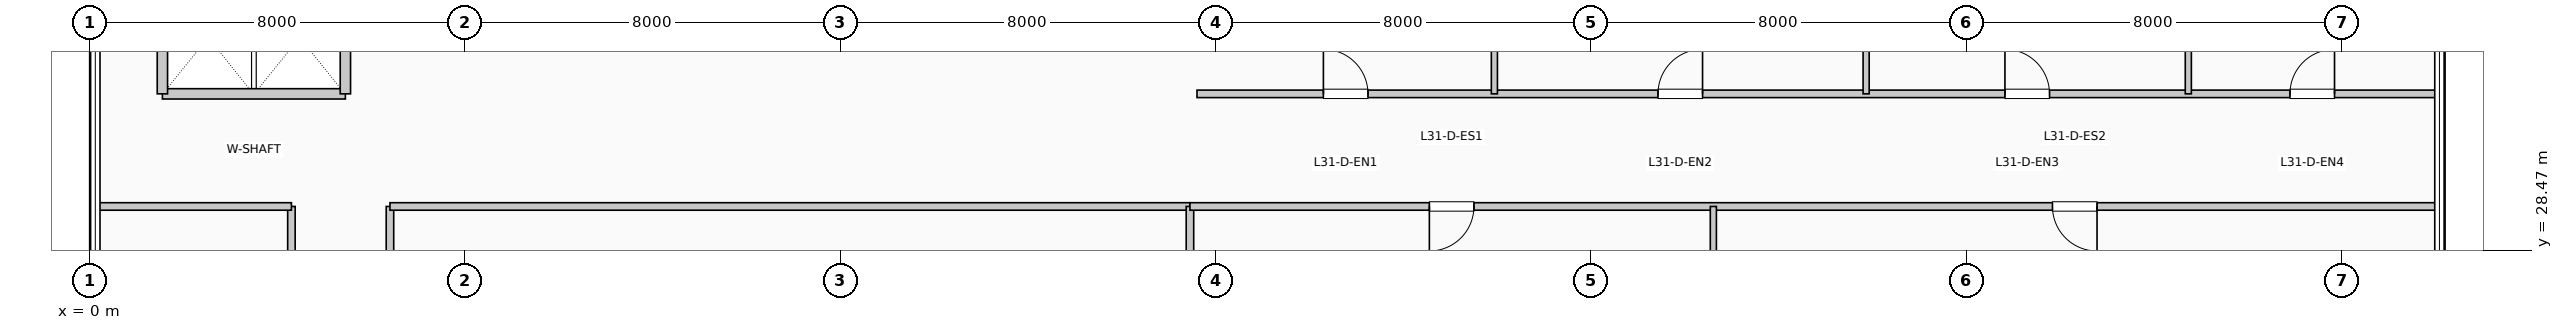
"""IFC4 building model, lengths in metres.
Left out: names, types, materials, properties, quantities, classifications, styles, units other than length and angle.
Written with IfcOpenShell. Run it as: python <this file> out.ifc"""

import sys

from ifc_helpers import new_model, si_unit, direction, frame, frame_2d, origin, place, context, subcontext, project, spatial, rectangle, extrude, element, fill, save


model = new_model("IFC4")
c1 = context("Model", 3, precision=1e-05, world=origin(), true_north=direction((0.0, 1.0)))
c2 = subcontext(c1, "Body", "Model", "MODEL_VIEW")
j1 = project(units=[si_unit("LENGTHUNIT", "METRE"), si_unit("PLANEANGLEUNIT", "RADIAN")], contexts=[c1])
p1 = place(None, origin())
s1 = spatial("IfcSite", under=j1, at=p1, CompositionType="ELEMENT")
p2 = place(p1, origin())
s2 = spatial("IfcBuilding", under=s1, at=p2, CompositionType="ELEMENT")
p3 = place(p2, frame((0.0, 0.0, 130.35)))
s3 = spatial("IfcBuildingStorey", under=s2, at=p3, CompositionType="ELEMENT", Elevation=130.35)
p4 = place(p3, frame((1.55, 31.8, 0.0), z_axis=(0.0, 0.0, 1.0), x_axis=(1.0, 0.0, 0.0)))
e1 = element("IfcWall", 1, at=p4, inside=s3, PredefinedType="PARTITIONING", context=c2, shape_type="SweptSolid", body=[
    extrude(rectangle(XDim=3.9, YDim=0.22, at=frame_2d((1.95, 0.0))), origin(), (0.0, 0.0, 1.0), 4.37),
])
for number, where, z_axis, x_axis in (
    (2, (1.55, 31.8, 0.0), (0.0, 0.0, 1.0), (0.0, 1.0, 0.0)),
    (3, (5.45, 31.8, 0.0), (0.0, 0.0, 1.0), (0.0, 1.0, 0.0)),
):
    element("IfcWall", number, at=place(p3, frame(where, z_axis=z_axis, x_axis=x_axis)), inside=s3, PredefinedType="PARTITIONING", context=c2, shape_type="SweptSolid", body=[
        extrude(rectangle(XDim=2.38, YDim=0.22, at=frame_2d((1.19, 0.0))), origin(), (0.0, 0.0, 1.0), 4.37),
    ])
p5 = place(p3, frame((4.3, 8.6, 0.0), z_axis=(0.0, 0.0, 1.0), x_axis=(0.0, 1.0, 0.0)))
e4 = element("IfcWall", 4, at=p5, inside=s3, PredefinedType="PARTITIONING", context=c2, shape_type="SweptSolid", body=[
    extrude(rectangle(XDim=20.8, YDim=0.16, at=frame_2d((10.4, 0.0))), origin(), (0.0, 0.0, 1.0), 4.37),
])
p6 = place(p5, frame((4.011, 0.0, 0.0), z_axis=(0.0, 0.0, 1.0), x_axis=(-1.0, 0.0, 0.0)))
e5 = element("IfcOpeningElement", 5, at=p6, cuts=e4, PredefinedType="OPENING", context=c2, shape_type="SweptSolid", body=[
    extrude(rectangle(XDim=0.95, YDim=2.15, at=frame_2d((0.475, 1.075))), frame((0.0, 0.09, 0.0), z_axis=(0.0, -1.0, 0.0), x_axis=(1.0, 0.0, 0.0)), (0.0, 0.0, 1.0), 0.18),
])
p7 = place(p5, frame((11.083, 0.0, 0.0), z_axis=(0.0, 0.0, 1.0), x_axis=(-1.0, 0.0, 0.0)))
e6 = element("IfcOpeningElement", 6, at=p7, cuts=e4, PredefinedType="OPENING", context=c2, shape_type="SweptSolid", body=[
    extrude(rectangle(XDim=0.95, YDim=2.15, at=frame_2d((0.475, 1.075))), frame((0.0, 0.09, 0.0), z_axis=(0.0, -1.0, 0.0), x_axis=(1.0, 0.0, 0.0)), (0.0, 0.0, 1.0), 0.18),
])
p8 = place(p5, frame((17.947, 0.0, 0.0), z_axis=(0.0, 0.0, 1.0), x_axis=(-1.0, 0.0, 0.0)))
e7 = element("IfcOpeningElement", 7, at=p8, cuts=e4, PredefinedType="OPENING", context=c2, shape_type="SweptSolid", body=[
    extrude(rectangle(XDim=0.95, YDim=2.15, at=frame_2d((0.475, 1.075))), frame((0.0, 0.09, 0.0), z_axis=(0.0, -1.0, 0.0), x_axis=(1.0, 0.0, 0.0)), (0.0, 0.0, 1.0), 0.18),
])
p9 = place(p3, frame((6.4, 8.6, 0.0), z_axis=(0.0, 0.0, 1.0), x_axis=(0.0, 1.0, 0.0)))
e8 = element("IfcWall", 8, at=p9, inside=s3, PredefinedType="PARTITIONING", context=c2, shape_type="SweptSolid", body=[
    extrude(rectangle(XDim=20.8, YDim=0.16, at=frame_2d((10.4, 0.0))), origin(), (0.0, 0.0, 1.0), 4.37),
])
p10 = place(p9, frame((1.397, 0.0, 0.0)))
e9 = element("IfcOpeningElement", 9, at=p10, cuts=e8, PredefinedType="OPENING", context=c2, shape_type="SweptSolid", body=[
    extrude(rectangle(XDim=0.95, YDim=2.15, at=frame_2d((0.475, 1.075))), frame((0.0, 0.09, 0.0), z_axis=(0.0, -1.0, 0.0), x_axis=(1.0, 0.0, 0.0)), (0.0, 0.0, 1.0), 0.18),
])
p11 = place(p9, frame((5.349, 0.0, 0.0)))
e10 = element("IfcOpeningElement", 10, at=p11, cuts=e8, PredefinedType="OPENING", context=c2, shape_type="SweptSolid", body=[
    extrude(rectangle(XDim=0.95, YDim=2.15, at=frame_2d((0.475, 1.075))), frame((0.0, 0.09, 0.0), z_axis=(0.0, -1.0, 0.0), x_axis=(1.0, 0.0, 0.0)), (0.0, 0.0, 1.0), 0.18),
])
p12 = place(p9, frame((9.717, 0.0, 0.0)))
e11 = element("IfcOpeningElement", 11, at=p12, cuts=e8, PredefinedType="OPENING", context=c2, shape_type="SweptSolid", body=[
    extrude(rectangle(XDim=0.95, YDim=2.15, at=frame_2d((0.475, 1.075))), frame((0.0, 0.09, 0.0), z_axis=(0.0, -1.0, 0.0), x_axis=(1.0, 0.0, 0.0)), (0.0, 0.0, 1.0), 0.18),
])
p13 = place(p9, frame((14.293, 0.0, 0.0)))
e12 = element("IfcOpeningElement", 12, at=p13, cuts=e8, PredefinedType="OPENING", context=c2, shape_type="SweptSolid", body=[
    extrude(rectangle(XDim=0.95, YDim=2.15, at=frame_2d((0.475, 1.075))), frame((0.0, 0.09, 0.0), z_axis=(0.0, -1.0, 0.0), x_axis=(1.0, 0.0, 0.0)), (0.0, 0.0, 1.0), 0.18),
])
p14 = place(p9, frame((18.453, 0.0, 0.0)))
e13 = element("IfcOpeningElement", 13, at=p14, cuts=e8, PredefinedType="OPENING", context=c2, shape_type="SweptSolid", body=[
    extrude(rectangle(XDim=0.95, YDim=2.15, at=frame_2d((0.475, 1.075))), frame((0.0, 0.09, 0.0), z_axis=(0.0, -1.0, 0.0), x_axis=(1.0, 0.0, 0.0)), (0.0, 0.0, 1.0), 0.18),
])
p15 = place(p3, frame((0.19, 29.4, 0.0), z_axis=(0.0, 0.0, 1.0), x_axis=(1.0, 0.0, 0.0)))
e14 = element("IfcWall", 14, at=p15, inside=s3, PredefinedType="PARTITIONING", context=c2, shape_type="SweptSolid", body=[
    extrude(rectangle(XDim=4.11, YDim=0.16, at=frame_2d((2.055, 0.0))), origin(), (0.0, 0.0, 1.0), 4.025),
])
p16 = place(p3, frame((6.4, 29.4, 0.0), z_axis=(0.0, 0.0, 1.0), x_axis=(1.0, 0.0, 0.0)))
e15 = element("IfcWall", 15, at=p16, inside=s3, PredefinedType="PARTITIONING", context=c2, shape_type="SweptSolid", body=[
    extrude(rectangle(XDim=17.05, YDim=0.16, at=frame_2d((8.525, 0.0))), origin(), (0.0, 0.0, 1.0), 4.025),
])
p17 = place(p3, frame((23.45, 1.04, 0.0), z_axis=(0.0, 0.0, 1.0), x_axis=(0.0, 1.0, 0.0)))
e16 = element("IfcWall", 16, at=p17, inside=s3, PredefinedType="PARTITIONING", context=c2, shape_type="SweptSolid", body=[
    extrude(rectangle(XDim=28.36, YDim=0.16, at=frame_2d((14.18, 0.0))), origin(), (0.0, 0.0, 1.0), 3.705),
])
p18 = place(p3, frame((23.45, 29.4, 0.0), z_axis=(0.0, 0.0, 1.0), x_axis=(1.0, 0.0, 0.0)))
e17 = element("IfcWall", 17, at=p18, inside=s3, PredefinedType="PARTITIONING", context=c2, shape_type="SweptSolid", body=[
    extrude(rectangle(XDim=26.56, YDim=0.16, at=frame_2d((13.28, 0.0))), origin(), (0.0, 0.0, 1.0), 4.025),
])
p19 = place(p18, frame((6.052, 0.0, 0.0), z_axis=(0.0, 0.0, 1.0), x_axis=(-1.0, 0.0, 0.0)))
e18 = element("IfcOpeningElement", 18, at=p19, cuts=e17, PredefinedType="OPENING", context=c2, shape_type="SweptSolid", body=[
    extrude(rectangle(XDim=0.95, YDim=2.15, at=frame_2d((0.475, 1.075))), frame((0.0, 0.09, 0.0), z_axis=(0.0, -1.0, 0.0), x_axis=(1.0, 0.0, 0.0)), (0.0, 0.0, 1.0), 0.18),
])
p20 = place(p18, frame((19.333, 0.0, 0.0), z_axis=(0.0, 0.0, 1.0), x_axis=(-1.0, 0.0, 0.0)))
e19 = element("IfcOpeningElement", 19, at=p20, cuts=e17, PredefinedType="OPENING", context=c2, shape_type="SweptSolid", body=[
    extrude(rectangle(XDim=0.95, YDim=2.15, at=frame_2d((0.475, 1.075))), frame((0.0, 0.09, 0.0), z_axis=(0.0, -1.0, 0.0), x_axis=(1.0, 0.0, 0.0)), (0.0, 0.0, 1.0), 0.18),
])
p21 = place(p3, frame((23.6, 31.8, 0.0), z_axis=(0.0, 0.0, 1.0), x_axis=(1.0, 0.0, 0.0)))
e20 = element("IfcWall", 20, at=p21, inside=s3, PredefinedType="PARTITIONING", context=c2, shape_type="SweptSolid", body=[
    extrude(rectangle(XDim=26.41, YDim=0.16, at=frame_2d((13.205, 0.0))), origin(), (0.0, 0.0, 1.0), 4.37),
])
p22 = place(p21, frame((2.694, 0.0, 0.0)))
e21 = element("IfcOpeningElement", 21, at=p22, cuts=e20, PredefinedType="OPENING", context=c2, shape_type="SweptSolid", body=[
    extrude(rectangle(XDim=0.95, YDim=2.15, at=frame_2d((0.475, 1.075))), frame((0.0, 0.09, 0.0), z_axis=(0.0, -1.0, 0.0), x_axis=(1.0, 0.0, 0.0)), (0.0, 0.0, 1.0), 0.18),
])
p23 = place(p21, frame((9.825, 0.0, 0.0)))
e22 = element("IfcOpeningElement", 22, at=p23, cuts=e20, PredefinedType="OPENING", context=c2, shape_type="SweptSolid", body=[
    extrude(rectangle(XDim=0.95, YDim=2.15, at=frame_2d((0.475, 1.075))), frame((0.0, 0.09, 0.0), z_axis=(0.0, -1.0, 0.0), x_axis=(1.0, 0.0, 0.0)), (0.0, 0.0, 1.0), 0.18),
])
p24 = place(p21, frame((17.22, 0.0, 0.0)))
e23 = element("IfcOpeningElement", 23, at=p24, cuts=e20, PredefinedType="OPENING", context=c2, shape_type="SweptSolid", body=[
    extrude(rectangle(XDim=0.95, YDim=2.15, at=frame_2d((0.475, 1.075))), frame((0.0, 0.09, 0.0), z_axis=(0.0, -1.0, 0.0), x_axis=(1.0, 0.0, 0.0)), (0.0, 0.0, 1.0), 0.18),
])
p25 = place(p21, frame((23.294, 0.0, 0.0)))
e24 = element("IfcOpeningElement", 24, at=p25, cuts=e20, PredefinedType="OPENING", context=c2, shape_type="SweptSolid", body=[
    extrude(rectangle(XDim=0.95, YDim=2.15, at=frame_2d((0.475, 1.075))), frame((0.0, 0.09, 0.0), z_axis=(0.0, -1.0, 0.0), x_axis=(1.0, 0.0, 0.0)), (0.0, 0.0, 1.0), 0.18),
])
p26 = place(p3, frame((34.605, 22.19, 0.0), z_axis=(0.0, 0.0, 1.0), x_axis=(0.0, 1.0, 0.0)))
e25 = element("IfcWall", 25, at=p26, inside=s3, PredefinedType="PARTITIONING", context=c2, shape_type="SweptSolid", body=[
    extrude(rectangle(XDim=7.21, YDim=0.13, at=frame_2d((3.605, 0.0))), origin(), (0.0, 0.0, 1.0), 4.37),
])
for number, where, z_axis, x_axis in (
    (26, (29.938, 31.8, 0.0), (0.0, 0.0, 1.0), (0.0, 1.0, 0.0)),
    (27, (37.861, 31.8, 0.0), (0.0, 0.0, 1.0), (0.0, 1.0, 0.0)),
    (28, (44.728, 31.8, 0.0), (0.0, 0.0, 1.0), (0.0, 1.0, 0.0)),
):
    element("IfcWall", number, at=place(p3, frame(where, z_axis=z_axis, x_axis=x_axis)), inside=s3, PredefinedType="PARTITIONING", context=c2, shape_type="SweptSolid", body=[
        extrude(rectangle(XDim=14.01, YDim=0.13, at=frame_2d((7.005, 0.0))), origin(), (0.0, 0.0, 1.0), 4.37),
    ])
p27 = place(p19, origin())
e29 = element("IfcDoor", 29, at=p27, inside=s3, OperationType="SINGLE_SWING_LEFT", PredefinedType="DOOR", context=c2, shape_type="SweptSolid", body=[
    extrude(rectangle(XDim=0.95, YDim=2.15, at=frame_2d((0.475, 1.075))), frame((0.0, 0.025, 0.0), z_axis=(0.0, -1.0, 0.0), x_axis=(1.0, 0.0, 0.0)), (0.0, 0.0, 1.0), 0.05),
])
fill(e18, e29)
p28 = place(p20, origin())
e30 = element("IfcDoor", 30, at=p28, inside=s3, OperationType="SINGLE_SWING_RIGHT", PredefinedType="DOOR", context=c2, shape_type="SweptSolid", body=[
    extrude(rectangle(XDim=0.95, YDim=2.15, at=frame_2d((0.475, 1.075))), frame((0.0, 0.025, 0.0), z_axis=(0.0, -1.0, 0.0), x_axis=(1.0, 0.0, 0.0)), (0.0, 0.0, 1.0), 0.05),
])
fill(e19, e30)
p29 = place(p22, origin())
e31 = element("IfcDoor", 31, at=p29, inside=s3, OperationType="SINGLE_SWING_LEFT", PredefinedType="DOOR", context=c2, shape_type="SweptSolid", body=[
    extrude(rectangle(XDim=0.95, YDim=2.15, at=frame_2d((0.475, 1.075))), frame((0.0, 0.025, 0.0), z_axis=(0.0, -1.0, 0.0), x_axis=(1.0, 0.0, 0.0)), (0.0, 0.0, 1.0), 0.05),
])
fill(e21, e31)
p30 = place(p23, origin())
e32 = element("IfcDoor", 32, at=p30, inside=s3, OperationType="SINGLE_SWING_RIGHT", PredefinedType="DOOR", context=c2, shape_type="SweptSolid", body=[
    extrude(rectangle(XDim=0.95, YDim=2.15, at=frame_2d((0.475, 1.075))), frame((0.0, 0.025, 0.0), z_axis=(0.0, -1.0, 0.0), x_axis=(1.0, 0.0, 0.0)), (0.0, 0.0, 1.0), 0.05),
])
fill(e22, e32)
p31 = place(p24, origin())
e33 = element("IfcDoor", 33, at=p31, inside=s3, OperationType="SINGLE_SWING_LEFT", PredefinedType="DOOR", context=c2, shape_type="SweptSolid", body=[
    extrude(rectangle(XDim=0.95, YDim=2.15, at=frame_2d((0.475, 1.075))), frame((0.0, 0.025, 0.0), z_axis=(0.0, -1.0, 0.0), x_axis=(1.0, 0.0, 0.0)), (0.0, 0.0, 1.0), 0.05),
])
fill(e23, e33)
p32 = place(p25, origin())
e34 = element("IfcDoor", 34, at=p32, inside=s3, OperationType="SINGLE_SWING_RIGHT", PredefinedType="DOOR", context=c2, shape_type="SweptSolid", body=[
    extrude(rectangle(XDim=0.95, YDim=2.15, at=frame_2d((0.475, 1.075))), frame((0.0, 0.025, 0.0), z_axis=(0.0, -1.0, 0.0), x_axis=(1.0, 0.0, 0.0)), (0.0, 0.0, 1.0), 0.05),
])
fill(e24, e34)
save(model, sys.argv[1])
